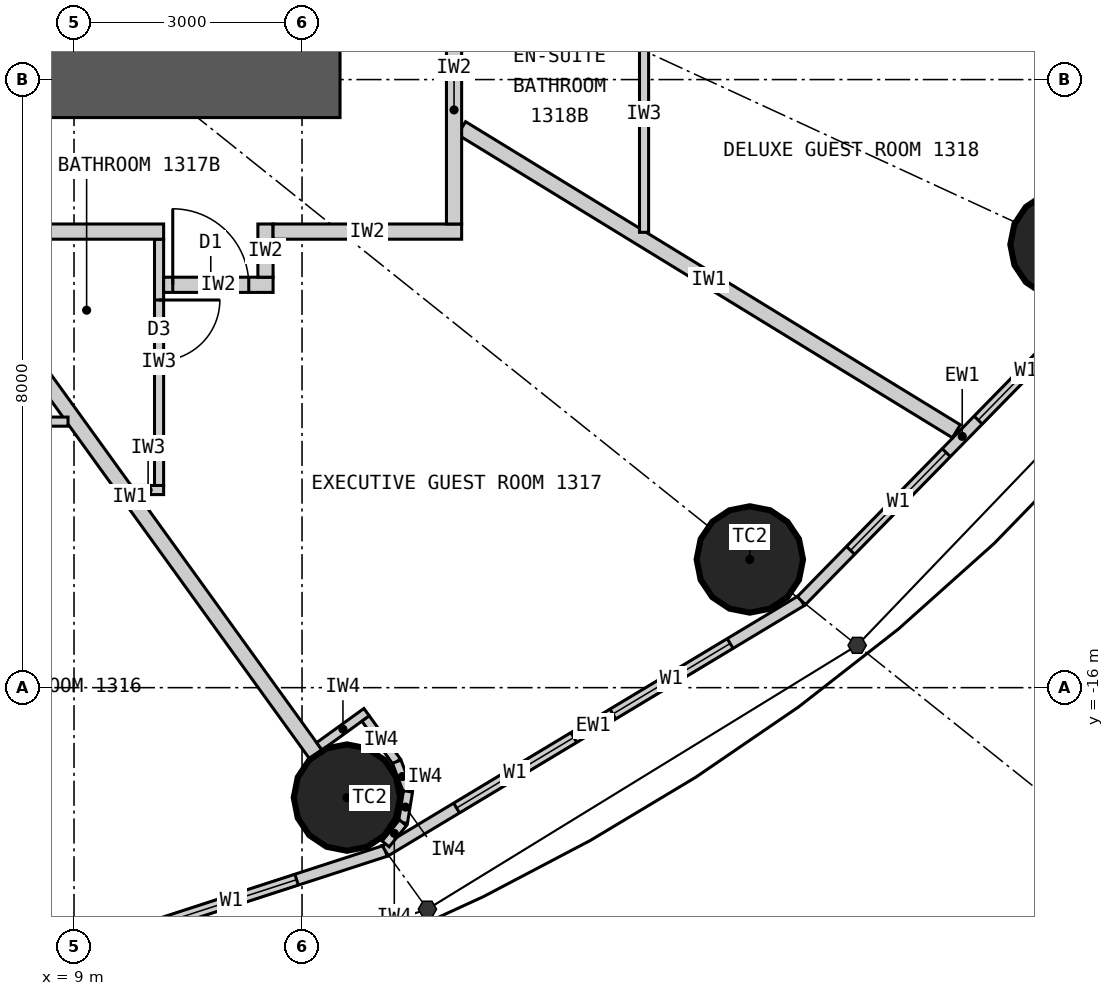
"""IFC4 building model, lengths in metres.
Left out: names, types, materials, properties, quantities, classifications, styles, units other than length and angle.
Written with IfcOpenShell. Run it as: python <this file> out.ifc"""

import sys

from ifc_helpers import new_model, si_unit, direction, frame, frame_2d, origin, origin_2d, place, context, subcontext, project, spatial, rectangle, circle, extrude, element, fill, save


model = new_model("IFC4")
c1 = context("Model", 3, precision=1e-05, world=origin(), true_north=direction((0.0, 1.0)))
c2 = subcontext(c1, "Body", "Model", "MODEL_VIEW")
j1 = project(units=[si_unit("LENGTHUNIT", "METRE"), si_unit("PLANEANGLEUNIT", "RADIAN")], contexts=[c1])
p1 = place(None, origin())
s1 = spatial("IfcSite", under=j1, at=p1, CompositionType="ELEMENT")
p2 = place(p1, origin())
s2 = spatial("IfcBuilding", under=s1, at=p2, CompositionType="ELEMENT")
p3 = place(p2, frame((0.0, 0.0, 57.3)))
s3 = spatial("IfcBuildingStorey", under=s2, at=p3, CompositionType="ELEMENT", Elevation=57.3)
for number, where, z_axis, x_axis in (
    (1, (12.591, -17.447, 0.0), (0.0, 0.0, 1.0), (1.0, 0.0, 0.0)),
    (2, (17.892, -14.313, 0.0), (0.0, 0.0, 1.0), (1.0, 0.0, 0.0)),
    (3, (22.019, -10.17, 0.0), (0.0, 0.0, 1.0), (1.0, 0.0, 0.0)),
):
    element("IfcColumn", number, at=place(p3, frame(where, z_axis=z_axis, x_axis=x_axis)), inside=s3, PredefinedType="COLUMN", context=c2, shape_type="SweptSolid", body=[
        extrude(circle(Radius=0.7, at=origin_2d()), origin(), (0.0, 0.0, 1.0), 3.3),
    ])
p4 = place(p3, frame((12.5, -8.0, 0.0), z_axis=(0.0, 0.0, 1.0), x_axis=(-1.0, 0.0, 0.0)))
e4 = element("IfcWall", 4, at=p4, inside=s3, PredefinedType="SHEAR", context=c2, shape_type="SweptSolid", body=[
    extrude(rectangle(XDim=25.0, YDim=1.0, at=frame_2d((12.5, 0.0))), origin(), (0.0, 0.0, 1.0), 3.3),
])
p5 = place(p4, frame((11.2, 0.0, 0.0)))
e5 = element("IfcOpeningElement", 5, at=p5, cuts=e4, PredefinedType="OPENING", context=c2, shape_type="SweptSolid", body=[
    extrude(rectangle(XDim=1.2, YDim=2.2, at=frame_2d((0.6, 1.1))), frame((0.0, 0.51, 0.0), z_axis=(0.0, -1.0, 0.0), x_axis=(1.0, 0.0, 0.0)), (0.0, 0.0, 1.0), 1.02),
])
p6 = place(p4, frame((18.8, 0.0, 0.0)))
e6 = element("IfcOpeningElement", 6, at=p6, cuts=e4, PredefinedType="OPENING", context=c2, shape_type="SweptSolid", body=[
    extrude(rectangle(XDim=0.9, YDim=2.2, at=frame_2d((0.45, 1.1))), frame((0.0, 0.51, 0.0), z_axis=(0.0, -1.0, 0.0), x_axis=(1.0, 0.0, 0.0)), (0.0, 0.0, 1.0), 1.02),
])
p7 = place(p3, frame((6.766, -20.202, 0.0), z_axis=(0.0, 0.0, 1.0), x_axis=(0.951137534625, 0.308767534285, 0.0)))
e7 = element("IfcWall", 7, at=p7, inside=s3, PredefinedType="ELEMENTEDWALL", context=c2, shape_type="SweptSolid", body=[
    extrude(rectangle(XDim=6.655, YDim=0.15, at=frame_2d((3.328, 0.0))), origin(), (0.0, 0.0, 1.0), 3.12),
])
p8 = place(p7, frame((1.228, 0.0, 0.9)))
e8 = element("IfcOpeningElement", 8, at=p8, cuts=e7, PredefinedType="OPENING", context=c2, shape_type="SweptSolid", body=[
    extrude(rectangle(XDim=1.8, YDim=1.9, at=frame_2d((0.9, 0.95))), frame((0.0, 0.085, 0.0), z_axis=(0.0, -1.0, 0.0), x_axis=(1.0, 0.0, 0.0)), (0.0, 0.0, 1.0), 0.17),
])
p9 = place(p7, frame((3.628, 0.0, 0.9)))
e9 = element("IfcOpeningElement", 9, at=p9, cuts=e7, PredefinedType="OPENING", context=c2, shape_type="SweptSolid", body=[
    extrude(rectangle(XDim=1.8, YDim=1.9, at=frame_2d((0.9, 0.95))), frame((0.0, 0.085, 0.0), z_axis=(0.0, -1.0, 0.0), x_axis=(1.0, 0.0, 0.0)), (0.0, 0.0, 1.0), 0.17),
])
p10 = place(p3, frame((13.096, -18.147, 0.0), z_axis=(0.0, 0.0, 1.0), x_axis=(0.856983180864, 0.515344377787, 0.0)))
e10 = element("IfcWall", 10, at=p10, inside=s3, PredefinedType="ELEMENTEDWALL", context=c2, shape_type="SweptSolid", body=[
    extrude(rectangle(XDim=6.386, YDim=0.15, at=frame_2d((3.193, 0.0))), origin(), (0.0, 0.0, 1.0), 3.12),
])
p11 = place(p10, frame((1.093, 0.0, 0.9)))
e11 = element("IfcOpeningElement", 11, at=p11, cuts=e10, PredefinedType="OPENING", context=c2, shape_type="SweptSolid", body=[
    extrude(rectangle(XDim=1.8, YDim=1.9, at=frame_2d((0.9, 0.95))), frame((0.0, 0.085, 0.0), z_axis=(0.0, -1.0, 0.0), x_axis=(1.0, 0.0, 0.0)), (0.0, 0.0, 1.0), 0.17),
])
p12 = place(p10, frame((3.493, 0.0, 0.9)))
e12 = element("IfcOpeningElement", 12, at=p12, cuts=e10, PredefinedType="OPENING", context=c2, shape_type="SweptSolid", body=[
    extrude(rectangle(XDim=1.8, YDim=1.9, at=frame_2d((0.9, 0.95))), frame((0.0, 0.085, 0.0), z_axis=(0.0, -1.0, 0.0), x_axis=(1.0, 0.0, 0.0)), (0.0, 0.0, 1.0), 0.17),
])
p13 = place(p3, frame((18.57, -14.856, 0.0), z_axis=(0.0, 0.0, 1.0), x_axis=(0.699602905915, 0.714531856557, 0.0)))
e13 = element("IfcWall", 13, at=p13, inside=s3, PredefinedType="ELEMENTEDWALL", context=c2, shape_type="SweptSolid", body=[
    extrude(rectangle(XDim=6.051, YDim=0.15, at=frame_2d((3.025, 0.0))), origin(), (0.0, 0.0, 1.0), 3.12),
])
p14 = place(p13, frame((0.926, 0.0, 0.9)))
e14 = element("IfcOpeningElement", 14, at=p14, cuts=e13, PredefinedType="OPENING", context=c2, shape_type="SweptSolid", body=[
    extrude(rectangle(XDim=1.8, YDim=1.9, at=frame_2d((0.9, 0.95))), frame((0.0, 0.085, 0.0), z_axis=(0.0, -1.0, 0.0), x_axis=(1.0, 0.0, 0.0)), (0.0, 0.0, 1.0), 0.17),
])
p15 = place(p13, frame((3.325, 0.0, 0.9)))
e15 = element("IfcOpeningElement", 15, at=p15, cuts=e13, PredefinedType="OPENING", context=c2, shape_type="SweptSolid", body=[
    extrude(rectangle(XDim=1.8, YDim=1.9, at=frame_2d((0.9, 0.95))), frame((0.0, 0.085, 0.0), z_axis=(0.0, -1.0, 0.0), x_axis=(1.0, 0.0, 0.0)), (0.0, 0.0, 1.0), 0.17),
])
p16 = place(p3, frame((7.289, -10.1, 0.0), z_axis=(0.0, 0.0, 1.0), x_axis=(0.585198353053, -0.810890182197, 0.0)))
e16 = element("IfcWall", 16, at=p16, inside=s3, PredefinedType="PARTITIONING", context=c2, shape_type="SweptSolid", body=[
    extrude(rectangle(XDim=8.36, YDim=0.2, at=frame_2d((4.18, 0.0))), origin(), (0.0, 0.0, 1.0), 2.32),
])
p17 = place(p3, frame((14.1, -8.639, 0.0), z_axis=(0.0, 0.0, 1.0), x_axis=(0.852672493023, -0.522445805459, 0.0)))
e17 = element("IfcWall", 17, at=p17, inside=s3, PredefinedType="PARTITIONING", context=c2, shape_type="SweptSolid", body=[
    extrude(rectangle(XDim=7.633, YDim=0.2, at=frame_2d((3.817, 0.0))), origin(), (0.0, 0.0, 1.0), 3.12),
])
p18 = place(p3, frame((14.1, -4.663, 0.0), z_axis=(0.0, 0.0, 1.0), x_axis=(0.949432655039, -0.31397075269, 0.0)))
e18 = element("IfcWall", 18, at=p18, inside=s3, PredefinedType="PARTITIONING", context=c2, shape_type="SweptSolid", body=[
    extrude(rectangle(XDim=10.486, YDim=0.2, at=frame_2d((5.243, 0.0))), origin(), (0.0, 0.0, 1.0), 3.12),
])
p19 = place(p3, frame((8.921, -12.5, 0.0), z_axis=(0.0, 0.0, 1.0), x_axis=(-1.0, 0.0, 0.0)))
e19 = element("IfcWall", 19, at=p19, inside=s3, PredefinedType="PARTITIONING", context=c2, shape_type="SweptSolid", body=[
    extrude(rectangle(XDim=3.372, YDim=0.12, at=frame_2d((1.686, 0.0))), origin(), (0.0, 0.0, 1.0), 3.12),
])
p20 = place(p3, frame((9.771, -13.4, 0.0), z_axis=(0.0, 0.0, 1.0), x_axis=(1.0, 0.0, 0.0)))
e20 = element("IfcWall", 20, at=p20, inside=s3, PredefinedType="PARTITIONING", context=c2, shape_type="SweptSolid", body=[
    extrude(rectangle(XDim=0.408, YDim=0.12, at=frame_2d((0.204, 0.0))), origin(), (0.0, 0.0, 1.0), 3.12),
])
p21 = place(p3, frame((10.119, -10.1, 0.0), z_axis=(0.0, 0.0, 1.0), x_axis=(0.0, -1.0, 0.0)))
e21 = element("IfcWall", 21, at=p21, inside=s3, PredefinedType="PARTITIONING", context=c2, shape_type="SweptSolid", body=[
    extrude(rectangle(XDim=3.24, YDim=0.12, at=frame_2d((1.62, 0.0))), origin(), (0.0, 0.0, 1.0), 3.12),
])
p22 = place(p21, frame((0.8, 0.0, 0.0)))
e22 = element("IfcOpeningElement", 22, at=p22, cuts=e21, PredefinedType="OPENING", context=c2, shape_type="SweptSolid", body=[
    extrude(rectangle(XDim=0.8, YDim=2.1, at=frame_2d((0.4, 1.05))), frame((0.0, 0.07, 0.0), z_axis=(0.0, -1.0, 0.0), x_axis=(1.0, 0.0, 0.0)), (0.0, 0.0, 1.0), 0.14),
])
p23 = place(p3, frame((16.5, -10.01, 0.0), z_axis=(0.0, 0.0, 1.0), x_axis=(0.0, 1.0, 0.0)))
e23 = element("IfcWall", 23, at=p23, inside=s3, PredefinedType="PARTITIONING", context=c2, shape_type="SweptSolid", body=[
    extrude(rectangle(XDim=3.111, YDim=0.12, at=frame_2d((1.555, 0.0))), origin(), (0.0, 0.0, 1.0), 3.12),
])
p24 = place(p3, frame((11.619, -10.7, 0.0), z_axis=(0.0, 0.0, 1.0), x_axis=(-1.0, 0.0, 0.0)))
e24 = element("IfcWall", 24, at=p24, inside=s3, PredefinedType="PARTITIONING", context=c2, shape_type="SweptSolid", body=[
    extrude(rectangle(XDim=1.44, YDim=0.2, at=frame_2d((0.72, 0.0))), origin(), (0.0, 0.0, 1.0), 3.12),
])
p25 = place(p24, frame((0.32, 0.0, 0.0)))
e25 = element("IfcOpeningElement", 25, at=p25, cuts=e24, PredefinedType="OPENING", context=c2, shape_type="SweptSolid", body=[
    extrude(rectangle(XDim=1.0, YDim=2.2, at=frame_2d((0.5, 1.1))), frame((0.0, 0.11, 0.0), z_axis=(0.0, -1.0, 0.0), x_axis=(1.0, 0.0, 0.0)), (0.0, 0.0, 1.0), 0.22),
])
p26 = place(p3, frame((11.519, -9.9, 0.0), z_axis=(0.0, 0.0, 1.0), x_axis=(0.0, -1.0, 0.0)))
e26 = element("IfcWall", 26, at=p26, inside=s3, PredefinedType="PARTITIONING", context=c2, shape_type="SweptSolid", body=[
    extrude(rectangle(XDim=0.7, YDim=0.2, at=frame_2d((0.35, 0.0))), origin(), (0.0, 0.0, 1.0), 3.12),
])
p27 = place(p3, frame((14.1, -10.0, 0.0), z_axis=(0.0, 0.0, 1.0), x_axis=(-1.0, 0.0, 0.0)))
e27 = element("IfcWall", 27, at=p27, inside=s3, PredefinedType="PARTITIONING", context=c2, shape_type="SweptSolid", body=[
    extrude(rectangle(XDim=2.481, YDim=0.2, at=frame_2d((1.24, 0.0))), origin(), (0.0, 0.0, 1.0), 3.12),
])
p28 = place(p3, frame((10.179, -10.0, 0.0), z_axis=(0.0, 0.0, 1.0), x_axis=(-1.0, 0.0, 0.0)))
e28 = element("IfcWall", 28, at=p28, inside=s3, PredefinedType="PARTITIONING", context=c2, shape_type="SweptSolid", body=[
    extrude(rectangle(XDim=4.63, YDim=0.2, at=frame_2d((2.315, 0.0))), origin(), (0.0, 0.0, 1.0), 3.12),
])
p29 = place(p3, frame((14.0, -9.9, 0.0), z_axis=(0.0, 0.0, 1.0), x_axis=(0.0, 1.0, 0.0)))
e29 = element("IfcWall", 29, at=p29, inside=s3, PredefinedType="PARTITIONING", context=c2, shape_type="SweptSolid", body=[
    extrude(rectangle(XDim=3.001, YDim=0.2, at=frame_2d((1.5, 0.0))), origin(), (0.0, 0.0, 1.0), 3.12),
])
p30 = place(p3, frame((12.227, -16.772, 0.0), z_axis=(0.0, 0.0, 1.0), x_axis=(0.810821798253, 0.585293098778, 0.0)))
e30 = element("IfcWall", 30, at=p30, inside=s3, PredefinedType="PARTITIONING", context=c2, shape_type="SweptSolid", body=[
    extrude(rectangle(XDim=0.768, YDim=0.12, at=frame_2d((0.384, 0.0))), origin(), (0.0, 0.0, 1.0), 3.12),
])
p31 = place(p3, frame((12.836, -16.406, 0.0), z_axis=(0.0, 0.0, 1.0), x_axis=(0.585223113993, -0.810872312296, 0.0)))
e31 = element("IfcWall", 31, at=p31, inside=s3, PredefinedType="PARTITIONING", context=c2, shape_type="SweptSolid", body=[
    extrude(rectangle(XDim=0.7, YDim=0.12, at=frame_2d((0.35, 0.0))), origin(), (0.0, 0.0, 1.0), 3.12),
])
p32 = place(p3, frame((13.246, -16.974, 0.0), z_axis=(0.0, 0.0, 1.0), x_axis=(0.355728122235, -0.934589483705, 0.0)))
e32 = element("IfcWall", 32, at=p32, inside=s3, PredefinedType="PARTITIONING", context=c2, shape_type="SweptSolid", body=[
    extrude(rectangle(XDim=0.418, YDim=0.12, at=frame_2d((0.209, 0.0))), origin(), (0.0, 0.0, 1.0), 3.12),
])
p33 = place(p3, frame((13.394, -17.365, 0.0), z_axis=(0.0, 0.0, 1.0), x_axis=(-0.159379276926, -0.987217425943, 0.0)))
e33 = element("IfcWall", 33, at=p33, inside=s3, PredefinedType="PARTITIONING", context=c2, shape_type="SweptSolid", body=[
    extrude(rectangle(XDim=0.418, YDim=0.12, at=frame_2d((0.209, 0.0))), origin(), (0.0, 0.0, 1.0), 3.12),
])
p34 = place(p3, frame((13.328, -17.777, 0.0), z_axis=(0.0, 0.0, 1.0), x_axis=(-0.632276783541, -0.774742582407, 0.0)))
e34 = element("IfcWall", 34, at=p34, inside=s3, PredefinedType="PARTITIONING", context=c2, shape_type="SweptSolid", body=[
    extrude(rectangle(XDim=0.36, YDim=0.12, at=frame_2d((0.18, 0.0))), origin(), (0.0, 0.0, 1.0), 3.12),
])
p35 = place(p9, origin())
e35 = element("IfcWindow", 35, at=p35, inside=s3, PartitioningType="SINGLE_PANEL", PredefinedType="WINDOW", context=c2, shape_type="SweptSolid", body=[
    extrude(rectangle(XDim=1.8, YDim=1.9, at=frame_2d((0.9, 0.95))), frame((0.0, 0.03, 0.0), z_axis=(0.0, -1.0, 0.0), x_axis=(1.0, 0.0, 0.0)), (0.0, 0.0, 1.0), 0.06),
])
fill(e9, e35)
p36 = place(p11, origin())
e36 = element("IfcWindow", 36, at=p36, inside=s3, PartitioningType="SINGLE_PANEL", PredefinedType="WINDOW", context=c2, shape_type="SweptSolid", body=[
    extrude(rectangle(XDim=1.8, YDim=1.9, at=frame_2d((0.9, 0.95))), frame((0.0, 0.03, 0.0), z_axis=(0.0, -1.0, 0.0), x_axis=(1.0, 0.0, 0.0)), (0.0, 0.0, 1.0), 0.06),
])
fill(e11, e36)
p37 = place(p12, origin())
e37 = element("IfcWindow", 37, at=p37, inside=s3, PartitioningType="SINGLE_PANEL", PredefinedType="WINDOW", context=c2, shape_type="SweptSolid", body=[
    extrude(rectangle(XDim=1.8, YDim=1.9, at=frame_2d((0.9, 0.95))), frame((0.0, 0.03, 0.0), z_axis=(0.0, -1.0, 0.0), x_axis=(1.0, 0.0, 0.0)), (0.0, 0.0, 1.0), 0.06),
])
fill(e12, e37)
p38 = place(p14, origin())
e38 = element("IfcWindow", 38, at=p38, inside=s3, PartitioningType="SINGLE_PANEL", PredefinedType="WINDOW", context=c2, shape_type="SweptSolid", body=[
    extrude(rectangle(XDim=1.8, YDim=1.9, at=frame_2d((0.9, 0.95))), frame((0.0, 0.03, 0.0), z_axis=(0.0, -1.0, 0.0), x_axis=(1.0, 0.0, 0.0)), (0.0, 0.0, 1.0), 0.06),
])
fill(e14, e38)
p39 = place(p15, origin())
e39 = element("IfcWindow", 39, at=p39, inside=s3, PartitioningType="SINGLE_PANEL", PredefinedType="WINDOW", context=c2, shape_type="SweptSolid", body=[
    extrude(rectangle(XDim=1.8, YDim=1.9, at=frame_2d((0.9, 0.95))), frame((0.0, 0.03, 0.0), z_axis=(0.0, -1.0, 0.0), x_axis=(1.0, 0.0, 0.0)), (0.0, 0.0, 1.0), 0.06),
])
fill(e15, e39)
p40 = place(p22, origin())
e40 = element("IfcDoor", 40, at=p40, inside=s3, OperationType="SINGLE_SWING_LEFT", PredefinedType="DOOR", context=c2, shape_type="SweptSolid", body=[
    extrude(rectangle(XDim=0.8, YDim=2.1, at=frame_2d((0.4, 1.05))), frame((0.0, 0.025, 0.0), z_axis=(0.0, -1.0, 0.0), x_axis=(1.0, 0.0, 0.0)), (0.0, 0.0, 1.0), 0.05),
])
fill(e22, e40)
p41 = place(p25, origin())
e41 = element("IfcDoor", 41, at=p41, inside=s3, OperationType="SINGLE_SWING_RIGHT", PredefinedType="DOOR", context=c2, shape_type="SweptSolid", body=[
    extrude(rectangle(XDim=1.0, YDim=2.2, at=frame_2d((0.5, 1.1))), frame((0.0, 0.025, 0.0), z_axis=(0.0, -1.0, 0.0), x_axis=(1.0, 0.0, 0.0)), (0.0, 0.0, 1.0), 0.05),
])
fill(e25, e41)
save(model, sys.argv[1])
